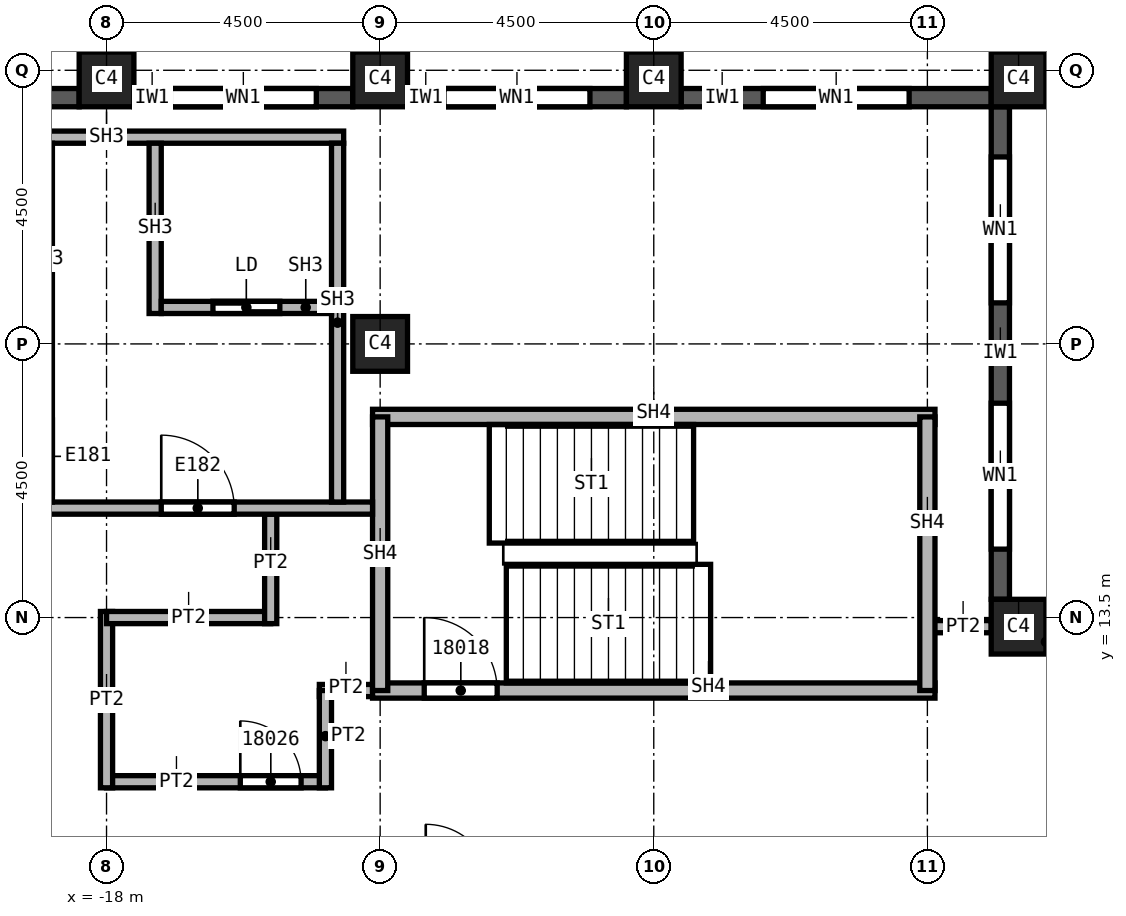
"""IFC4 building model, lengths in metres.
Left out: names, types, materials, properties, quantities, classifications, styles, units other than length and angle.
Written with IfcOpenShell. Run it as: python <this file> out.ifc"""

import sys

from ifc_helpers import new_model, si_unit, direction, frame, frame_2d, origin, origin_2d, place, context, subcontext, project, spatial, rectangle, extrude, element, fill, save


model = new_model("IFC4")
c1 = context("Model", 3, precision=1e-05, world=origin(), true_north=direction((0.0, 1.0)))
c2 = subcontext(c1, "Body", "Model", "MODEL_VIEW")
j1 = project(units=[si_unit("LENGTHUNIT", "METRE"), si_unit("PLANEANGLEUNIT", "RADIAN")], contexts=[c1])
p1 = place(None, origin())
s1 = spatial("IfcSite", under=j1, at=p1, CompositionType="ELEMENT")
p2 = place(p1, origin())
s2 = spatial("IfcBuilding", under=s1, at=p2, CompositionType="ELEMENT")
p3 = place(p2, frame((0.0, 0.0, 266.0)))
s3 = spatial("IfcBuildingStorey", under=s2, at=p3, CompositionType="ELEMENT", Elevation=266.0)
for number, where, z_axis, x_axis in (
    (1, (-13.5, 18.0, 0.0), (0.0, 0.0, 1.0), (1.0, 0.0, 0.0)),
    (2, (-3.0, 22.35, 0.0), (0.0, 0.0, 1.0), (1.0, 0.0, 0.0)),
    (3, (-9.0, 22.35, 0.0), (0.0, 0.0, 1.0), (1.0, 0.0, 0.0)),
    (4, (-13.5, 22.35, 0.0), (0.0, 0.0, 1.0), (1.0, 0.0, 0.0)),
    (5, (-18.0, 22.35, 0.0), (0.0, 0.0, 1.0), (1.0, 0.0, 0.0)),
    (6, (-3.0, 13.35, 0.0), (0.0, 0.0, 1.0), (1.0, 0.0, 0.0)),
):
    element("IfcColumn", number, at=place(p3, frame(where, z_axis=z_axis, x_axis=x_axis)), inside=s3, PredefinedType="COLUMN", context=c2, shape_type="SweptSolid", body=[
        extrude(rectangle(XDim=0.9, YDim=0.9, at=origin_2d()), origin(), (0.0, 0.0, 1.0), 3.72),
    ])
p4 = place(p3, frame((-3.3, 13.8, 0.0), z_axis=(0.0, 0.0, 1.0), x_axis=(0.0, 1.0, 0.0)))
e7 = element("IfcWall", 7, at=p4, inside=s3, PredefinedType="SOLIDWALL", context=c2, shape_type="SweptSolid", body=[
    extrude(rectangle(XDim=8.1, YDim=0.3, at=frame_2d((4.05, 0.0))), origin(), (0.0, 0.0, 1.0), 3.12),
])
p5 = place(p4, frame((0.825, 0.0, 0.8)))
e8 = element("IfcOpeningElement", 8, at=p5, cuts=e7, PredefinedType="OPENING", context=c2, shape_type="SweptSolid", body=[
    extrude(rectangle(XDim=2.4, YDim=1.95, at=frame_2d((1.2, 0.975))), frame((0.0, 0.15, 0.0), z_axis=(0.0, -1.0, 0.0), x_axis=(1.0, 0.0, 0.0)), (0.0, 0.0, 1.0), 0.3),
])
p6 = place(p4, frame((4.875, 0.0, 0.8)))
e9 = element("IfcOpeningElement", 9, at=p6, cuts=e7, PredefinedType="OPENING", context=c2, shape_type="SweptSolid", body=[
    extrude(rectangle(XDim=2.4, YDim=1.95, at=frame_2d((1.2, 0.975))), frame((0.0, 0.15, 0.0), z_axis=(0.0, -1.0, 0.0), x_axis=(1.0, 0.0, 0.0)), (0.0, 0.0, 1.0), 0.3),
])
p7 = place(p3, frame((-3.45, 22.05, 0.0), z_axis=(0.0, 0.0, 1.0), x_axis=(-1.0, 0.0, 0.0)))
e10 = element("IfcWall", 10, at=p7, inside=s3, PredefinedType="SOLIDWALL", context=c2, shape_type="SweptSolid", body=[
    extrude(rectangle(XDim=5.1, YDim=0.3, at=frame_2d((2.55, 0.0))), origin(), (0.0, 0.0, 1.0), 3.12),
])
p8 = place(p7, frame((1.35, 0.0, 0.8)))
e11 = element("IfcOpeningElement", 11, at=p8, cuts=e10, PredefinedType="OPENING", context=c2, shape_type="SweptSolid", body=[
    extrude(rectangle(XDim=2.4, YDim=1.95, at=frame_2d((1.2, 0.975))), frame((0.0, 0.15, 0.0), z_axis=(0.0, -1.0, 0.0), x_axis=(1.0, 0.0, 0.0)), (0.0, 0.0, 1.0), 0.3),
])
p9 = place(p3, frame((-9.45, 22.05, 0.0), z_axis=(0.0, 0.0, 1.0), x_axis=(-1.0, 0.0, 0.0)))
e12 = element("IfcWall", 12, at=p9, inside=s3, PredefinedType="SOLIDWALL", context=c2, shape_type="SweptSolid", body=[
    extrude(rectangle(XDim=3.6, YDim=0.3, at=frame_2d((1.8, 0.0))), origin(), (0.0, 0.0, 1.0), 3.12),
])
p10 = place(p9, frame((0.6, 0.0, 0.8)))
e13 = element("IfcOpeningElement", 13, at=p10, cuts=e12, PredefinedType="OPENING", context=c2, shape_type="SweptSolid", body=[
    extrude(rectangle(XDim=2.4, YDim=1.95, at=frame_2d((1.2, 0.975))), frame((0.0, 0.15, 0.0), z_axis=(0.0, -1.0, 0.0), x_axis=(1.0, 0.0, 0.0)), (0.0, 0.0, 1.0), 0.3),
])
p11 = place(p3, frame((-13.95, 22.05, 0.0), z_axis=(0.0, 0.0, 1.0), x_axis=(-1.0, 0.0, 0.0)))
e14 = element("IfcWall", 14, at=p11, inside=s3, PredefinedType="SOLIDWALL", context=c2, shape_type="SweptSolid", body=[
    extrude(rectangle(XDim=3.6, YDim=0.3, at=frame_2d((1.8, 0.0))), origin(), (0.0, 0.0, 1.0), 3.12),
])
p12 = place(p11, frame((0.6, 0.0, 0.8)))
e15 = element("IfcOpeningElement", 15, at=p12, cuts=e14, PredefinedType="OPENING", context=c2, shape_type="SweptSolid", body=[
    extrude(rectangle(XDim=2.4, YDim=1.95, at=frame_2d((1.2, 0.975))), frame((0.0, 0.15, 0.0), z_axis=(0.0, -1.0, 0.0), x_axis=(1.0, 0.0, 0.0)), (0.0, 0.0, 1.0), 0.3),
])
p13 = place(p3, frame((-18.45, 22.05, 0.0), z_axis=(0.0, 0.0, 1.0), x_axis=(-1.0, 0.0, 0.0)))
e16 = element("IfcWall", 16, at=p13, inside=s3, PredefinedType="SOLIDWALL", context=c2, shape_type="SweptSolid", body=[
    extrude(rectangle(XDim=3.6, YDim=0.3, at=frame_2d((1.8, 0.0))), origin(), (0.0, 0.0, 1.0), 3.12),
])
p14 = place(p13, frame((0.6, 0.0, 0.8)))
e17 = element("IfcOpeningElement", 17, at=p14, cuts=e16, PredefinedType="OPENING", context=c2, shape_type="SweptSolid", body=[
    extrude(rectangle(XDim=2.4, YDim=1.95, at=frame_2d((1.2, 0.975))), frame((0.0, 0.15, 0.0), z_axis=(0.0, -1.0, 0.0), x_axis=(1.0, 0.0, 0.0)), (0.0, 0.0, 1.0), 0.3),
])
p15 = place(p3, frame((-18.0, 10.8, 0.0), z_axis=(0.0, 0.0, 1.0), x_axis=(1.0, 0.0, 0.0)))
e18 = element("IfcWall", 18, at=p15, inside=s3, PredefinedType="PARTITIONING", context=c2, shape_type="SweptSolid", body=[
    extrude(rectangle(XDim=3.6, YDim=0.2, at=frame_2d((1.8, 0.0))), origin(), (0.0, 0.0, 1.0), 3.72),
])
p16 = place(p15, frame((2.2, 0.0, 0.0)))
e19 = element("IfcOpeningElement", 19, at=p16, cuts=e18, PredefinedType="OPENING", context=c2, shape_type="SweptSolid", body=[
    extrude(rectangle(XDim=1.0, YDim=2.1, at=frame_2d((0.5, 1.05))), frame((0.0, 0.1, 0.0), z_axis=(0.0, -1.0, 0.0), x_axis=(1.0, 0.0, 0.0)), (0.0, 0.0, 1.0), 0.2),
])
p17 = place(p3, frame((-18.0, 13.6, 0.0), z_axis=(0.0, 0.0, 1.0), x_axis=(0.0, -1.0, 0.0)))
e20 = element("IfcWall", 20, at=p17, inside=s3, PredefinedType="PARTITIONING", context=c2, shape_type="SweptSolid", body=[
    extrude(rectangle(XDim=2.9, YDim=0.2, at=frame_2d((1.45, 0.0))), origin(), (0.0, 0.0, 1.0), 3.72),
])
p18 = place(p3, frame((-15.3, 13.5, 0.0), z_axis=(0.0, 0.0, 1.0), x_axis=(-1.0, 0.0, 0.0)))
e21 = element("IfcWall", 21, at=p18, inside=s3, PredefinedType="PARTITIONING", context=c2, shape_type="SweptSolid", body=[
    extrude(rectangle(XDim=2.7, YDim=0.2, at=frame_2d((1.35, 0.0))), origin(), (0.0, 0.0, 1.0), 3.72),
])
p19 = place(p3, frame((-15.3, 15.2, 0.0), z_axis=(0.0, 0.0, 1.0), x_axis=(0.0, -1.0, 0.0)))
e22 = element("IfcWall", 22, at=p19, inside=s3, PredefinedType="PARTITIONING", context=c2, shape_type="SweptSolid", body=[
    extrude(rectangle(XDim=1.8, YDim=0.2, at=frame_2d((0.9, 0.0))), origin(), (0.0, 0.0, 1.0), 3.72),
])
p20 = place(p3, frame((-14.5, 12.3, 0.0), z_axis=(0.0, 0.0, 1.0), x_axis=(1.0, 0.0, 0.0)))
e23 = element("IfcWall", 23, at=p20, inside=s3, PredefinedType="PARTITIONING", context=c2, shape_type="SweptSolid", body=[
    extrude(rectangle(XDim=1.125, YDim=0.2, at=frame_2d((0.562, 0.0))), origin(), (0.0, 0.0, 1.0), 3.72),
])
p21 = place(p3, frame((-14.4, 10.7, 0.0), z_axis=(0.0, 0.0, 1.0), x_axis=(0.0, 1.0, 0.0)))
e24 = element("IfcWall", 24, at=p21, inside=s3, PredefinedType="PARTITIONING", context=c2, shape_type="SweptSolid", body=[
    extrude(rectangle(XDim=1.6, YDim=0.2, at=frame_2d((0.8, 0.0))), origin(), (0.0, 0.0, 1.0), 3.72),
])
p22 = place(p3, frame((-4.5, 13.35, 0.0), z_axis=(0.0, 0.0, 1.0), x_axis=(1.0, 0.0, 0.0)))
e25 = element("IfcWall", 25, at=p22, inside=s3, PredefinedType="PARTITIONING", context=c2, shape_type="SweptSolid", body=[
    extrude(rectangle(XDim=1.05, YDim=0.2, at=frame_2d((0.525, 0.0))), origin(), (0.0, 0.0, 1.0), 3.72),
])
p23 = place(p3, frame((-13.625, 12.3, 0.0), z_axis=(0.0, 0.0, 1.0), x_axis=(1.0, 0.0, 0.0)))
e26 = element("IfcWall", 26, at=p23, inside=s3, PredefinedType="SOLIDWALL", context=c2, shape_type="SweptSolid", body=[
    extrude(rectangle(XDim=9.25, YDim=0.25, at=frame_2d((4.625, 0.0))), origin(), (0.0, 0.0, 1.0), 3.72),
])
p24 = place(p23, frame((0.85, 0.0, 0.0)))
e27 = element("IfcOpeningElement", 27, at=p24, cuts=e26, PredefinedType="OPENING", context=c2, shape_type="SweptSolid", body=[
    extrude(rectangle(XDim=1.2, YDim=2.1, at=frame_2d((0.6, 1.05))), frame((0.0, 0.125, 0.0), z_axis=(0.0, -1.0, 0.0), x_axis=(1.0, 0.0, 0.0)), (0.0, 0.0, 1.0), 0.25),
])
p25 = place(p3, frame((-13.625, 16.8, 0.0), z_axis=(0.0, 0.0, 1.0), x_axis=(1.0, 0.0, 0.0)))
e28 = element("IfcWall", 28, at=p25, inside=s3, PredefinedType="SOLIDWALL", context=c2, shape_type="SweptSolid", body=[
    extrude(rectangle(XDim=9.25, YDim=0.25, at=frame_2d((4.625, 0.0))), origin(), (0.0, 0.0, 1.0), 3.72),
])
for number, where, z_axis, x_axis in (
    (29, (-13.5, 12.3, 0.0), (0.0, 0.0, 1.0), (0.0, 1.0, 0.0)),
    (30, (-4.5, 16.8, 0.0), (0.0, 0.0, 1.0), (0.0, -1.0, 0.0)),
):
    element("IfcWall", number, at=place(p3, frame(where, z_axis=z_axis, x_axis=x_axis)), inside=s3, PredefinedType="SOLIDWALL", context=c2, shape_type="SweptSolid", body=[
        extrude(rectangle(XDim=4.5, YDim=0.25, at=frame_2d((2.25, 0.0))), origin(), (0.0, 0.0, 1.0), 3.72),
    ])
p26 = place(p3, frame((-21.9, 15.3, 0.0), z_axis=(0.0, 0.0, 1.0), x_axis=(1.0, 0.0, 0.0)))
e31 = element("IfcWall", 31, at=p26, inside=s3, PredefinedType="SOLIDWALL", context=c2, shape_type="SweptSolid", body=[
    extrude(rectangle(XDim=8.275, YDim=0.2, at=frame_2d((4.137, 0.0))), origin(), (0.0, 0.0, 1.0), 3.72),
])
p27 = place(p26, frame((4.8, 0.0, 0.0)))
e32 = element("IfcOpeningElement", 32, at=p27, cuts=e31, PredefinedType="OPENING", context=c2, shape_type="SweptSolid", body=[
    extrude(rectangle(XDim=1.2, YDim=2.1, at=frame_2d((0.6, 1.05))), frame((0.0, 0.1, 0.0), z_axis=(0.0, -1.0, 0.0), x_axis=(1.0, 0.0, 0.0)), (0.0, 0.0, 1.0), 0.2),
])
p28 = place(p3, frame((-21.9, 21.4, 0.0), z_axis=(0.0, 0.0, 1.0), x_axis=(1.0, 0.0, 0.0)))
e33 = element("IfcWall", 33, at=p28, inside=s3, PredefinedType="SOLIDWALL", context=c2, shape_type="SweptSolid", body=[
    extrude(rectangle(XDim=7.8, YDim=0.2, at=frame_2d((3.9, 0.0))), origin(), (0.0, 0.0, 1.0), 3.72),
])
p29 = place(p3, frame((-14.2, 15.4, 0.0), z_axis=(0.0, 0.0, 1.0), x_axis=(0.0, 1.0, 0.0)))
e34 = element("IfcWall", 34, at=p29, inside=s3, PredefinedType="SOLIDWALL", context=c2, shape_type="SweptSolid", body=[
    extrude(rectangle(XDim=5.9, YDim=0.2, at=frame_2d((2.95, 0.0))), origin(), (0.0, 0.0, 1.0), 3.72),
])
p30 = place(p3, frame((-18.99, 15.4, 0.0), z_axis=(0.0, 0.0, 1.0), x_axis=(0.0, 1.0, 0.0)))
e35 = element("IfcWall", 35, at=p30, inside=s3, PredefinedType="SOLIDWALL", context=c2, shape_type="SweptSolid", body=[
    extrude(rectangle(XDim=5.9, YDim=0.2, at=frame_2d((2.95, 0.0))), origin(), (0.0, 0.0, 1.0), 3.72),
])
p31 = place(p30, frame((0.15, 0.0, 0.0)))
e36 = element("IfcOpeningElement", 36, at=p31, cuts=e35, PredefinedType="OPENING", context=c2, shape_type="SweptSolid", body=[
    extrude(rectangle(XDim=1.2, YDim=2.1, at=frame_2d((0.6, 1.05))), frame((0.0, 0.1, 0.0), z_axis=(0.0, -1.0, 0.0), x_axis=(1.0, 0.0, 0.0)), (0.0, 0.0, 1.0), 0.2),
])
p32 = place(p3, frame((-17.2, 18.5, 0.0), z_axis=(0.0, 0.0, 1.0), x_axis=(0.0, 1.0, 0.0)))
e37 = element("IfcWall", 37, at=p32, inside=s3, PredefinedType="SOLIDWALL", context=c2, shape_type="SweptSolid", body=[
    extrude(rectangle(XDim=2.8, YDim=0.2, at=frame_2d((1.4, 0.0))), origin(), (0.0, 0.0, 1.0), 3.72),
])
p33 = place(p3, frame((-17.1, 18.6, 0.0), z_axis=(0.0, 0.0, 1.0), x_axis=(1.0, 0.0, 0.0)))
e38 = element("IfcWall", 38, at=p33, inside=s3, PredefinedType="SOLIDWALL", context=c2, shape_type="SweptSolid", body=[
    extrude(rectangle(XDim=2.8, YDim=0.2, at=frame_2d((1.4, 0.0))), origin(), (0.0, 0.0, 1.0), 3.72),
])
p34 = place(p33, frame((0.85, 0.0, 0.0)))
e39 = element("IfcOpeningElement", 39, at=p34, cuts=e38, PredefinedType="OPENING", context=c2, shape_type="SweptSolid", body=[
    extrude(rectangle(XDim=1.1, YDim=2.1, at=frame_2d((0.55, 1.05))), frame((0.0, 0.1, 0.0), z_axis=(0.0, -1.0, 0.0), x_axis=(1.0, 0.0, 0.0)), (0.0, 0.0, 1.0), 0.2),
])
p35 = place(p5, origin())
e40 = element("IfcWindow", 40, at=p35, inside=s3, PartitioningType="SINGLE_PANEL", PredefinedType="WINDOW", context=c2, shape_type="SweptSolid", body=[
    extrude(rectangle(XDim=2.4, YDim=1.95, at=frame_2d((1.2, 0.975))), frame((0.0, 0.03, 0.0), z_axis=(0.0, -1.0, 0.0), x_axis=(1.0, 0.0, 0.0)), (0.0, 0.0, 1.0), 0.06),
])
fill(e8, e40)
p36 = place(p6, origin())
e41 = element("IfcWindow", 41, at=p36, inside=s3, PartitioningType="SINGLE_PANEL", PredefinedType="WINDOW", context=c2, shape_type="SweptSolid", body=[
    extrude(rectangle(XDim=2.4, YDim=1.95, at=frame_2d((1.2, 0.975))), frame((0.0, 0.03, 0.0), z_axis=(0.0, -1.0, 0.0), x_axis=(1.0, 0.0, 0.0)), (0.0, 0.0, 1.0), 0.06),
])
fill(e9, e41)
p37 = place(p8, origin())
e42 = element("IfcWindow", 42, at=p37, inside=s3, PartitioningType="SINGLE_PANEL", PredefinedType="WINDOW", context=c2, shape_type="SweptSolid", body=[
    extrude(rectangle(XDim=2.4, YDim=1.95, at=frame_2d((1.2, 0.975))), frame((0.0, 0.03, 0.0), z_axis=(0.0, -1.0, 0.0), x_axis=(1.0, 0.0, 0.0)), (0.0, 0.0, 1.0), 0.06),
])
fill(e11, e42)
p38 = place(p10, origin())
e43 = element("IfcWindow", 43, at=p38, inside=s3, PartitioningType="SINGLE_PANEL", PredefinedType="WINDOW", context=c2, shape_type="SweptSolid", body=[
    extrude(rectangle(XDim=2.4, YDim=1.95, at=frame_2d((1.2, 0.975))), frame((0.0, 0.03, 0.0), z_axis=(0.0, -1.0, 0.0), x_axis=(1.0, 0.0, 0.0)), (0.0, 0.0, 1.0), 0.06),
])
fill(e13, e43)
p39 = place(p12, origin())
e44 = element("IfcWindow", 44, at=p39, inside=s3, PartitioningType="SINGLE_PANEL", PredefinedType="WINDOW", context=c2, shape_type="SweptSolid", body=[
    extrude(rectangle(XDim=2.4, YDim=1.95, at=frame_2d((1.2, 0.975))), frame((0.0, 0.03, 0.0), z_axis=(0.0, -1.0, 0.0), x_axis=(1.0, 0.0, 0.0)), (0.0, 0.0, 1.0), 0.06),
])
fill(e15, e44)
p40 = place(p24, origin())
e45 = element("IfcDoor", 45, at=p40, inside=s3, OperationType="SINGLE_SWING_LEFT", PredefinedType="DOOR", context=c2, shape_type="SweptSolid", body=[
    extrude(rectangle(XDim=1.2, YDim=2.1, at=frame_2d((0.6, 1.05))), frame((0.0, 0.025, 0.0), z_axis=(0.0, -1.0, 0.0), x_axis=(1.0, 0.0, 0.0)), (0.0, 0.0, 1.0), 0.05),
])
fill(e27, e45)
p41 = place(p16, origin())
e46 = element("IfcDoor", 46, at=p41, inside=s3, OperationType="SINGLE_SWING_LEFT", PredefinedType="DOOR", context=c2, shape_type="SweptSolid", body=[
    extrude(rectangle(XDim=1.0, YDim=2.1, at=frame_2d((0.5, 1.05))), frame((0.0, 0.025, 0.0), z_axis=(0.0, -1.0, 0.0), x_axis=(1.0, 0.0, 0.0)), (0.0, 0.0, 1.0), 0.05),
])
fill(e19, e46)
p42 = place(p34, origin())
e47 = element("IfcDoor", 47, at=p42, inside=s3, OperationType="SLIDING_TO_LEFT", PredefinedType="DOOR", context=c2, shape_type="SweptSolid", body=[
    extrude(rectangle(XDim=1.1, YDim=2.1, at=frame_2d((0.55, 1.05))), frame((0.0, 0.025, 0.0), z_axis=(0.0, -1.0, 0.0), x_axis=(1.0, 0.0, 0.0)), (0.0, 0.0, 1.0), 0.05),
])
fill(e39, e47)
p43 = place(p27, origin())
e48 = element("IfcDoor", 48, at=p43, inside=s3, OperationType="SINGLE_SWING_RIGHT", PredefinedType="DOOR", context=c2, shape_type="SweptSolid", body=[
    extrude(rectangle(XDim=1.2, YDim=2.1, at=frame_2d((0.6, 1.05))), frame((0.0, 0.025, 0.0), z_axis=(0.0, -1.0, 0.0), x_axis=(1.0, 0.0, 0.0)), (0.0, 0.0, 1.0), 0.05),
])
fill(e32, e48)
save(model, sys.argv[1])
